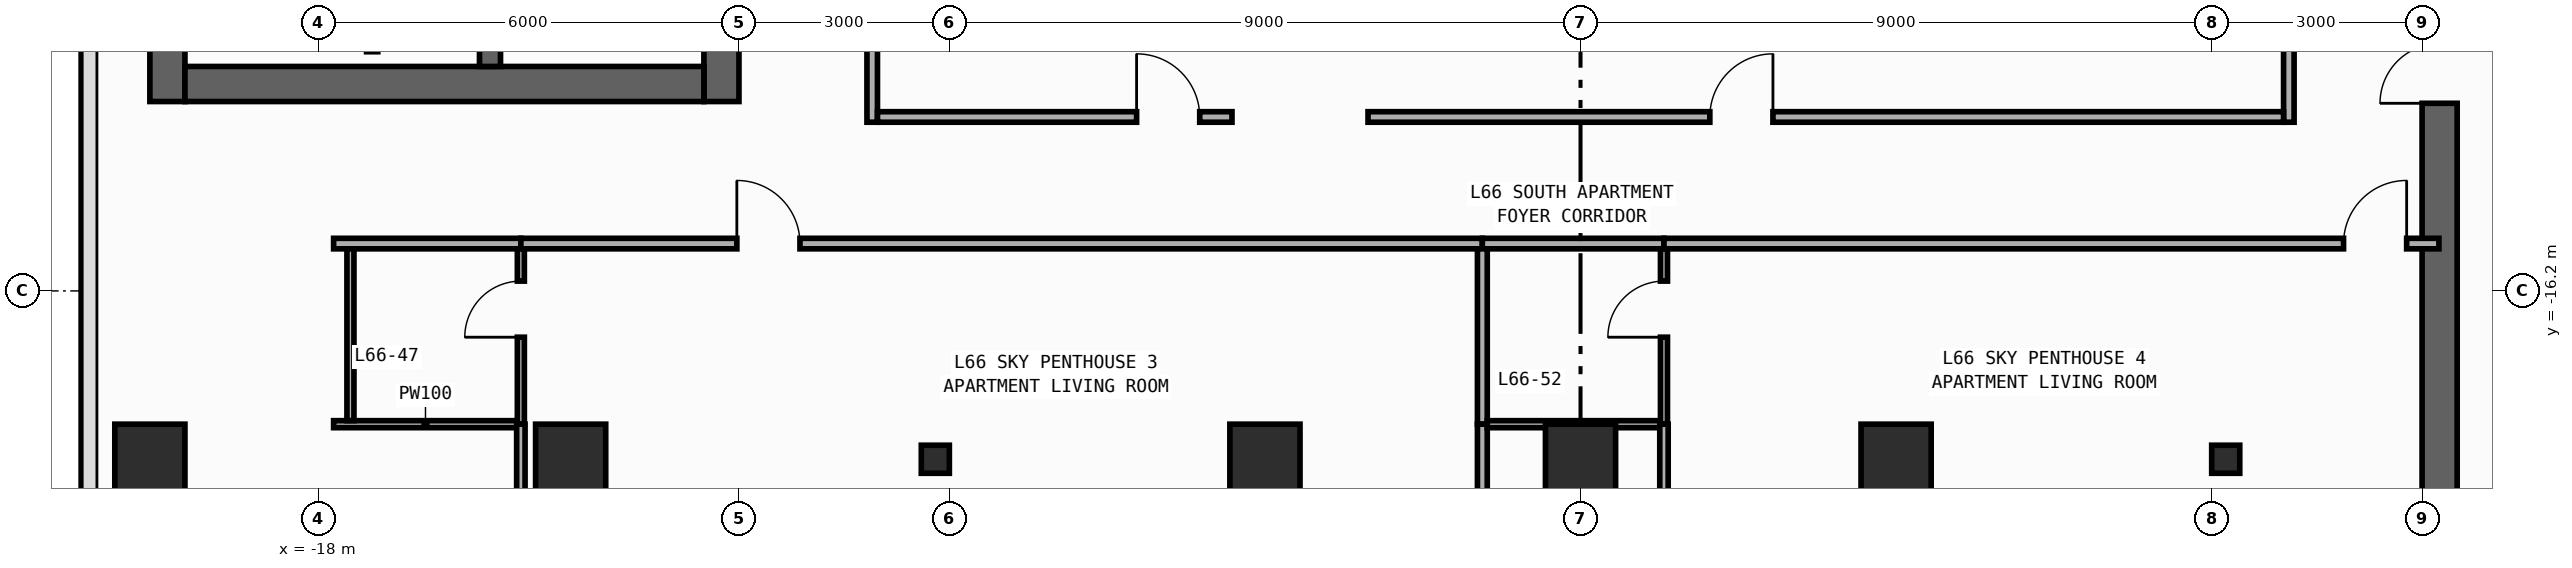
"""IFC4 building model, lengths in metres.
Left out: names, types, materials, properties, quantities, classifications, styles, units other than length and angle.
Written with IfcOpenShell. Run it as: python <this file> out.ifc"""

import sys

from ifc_helpers import new_model, si_unit, direction, frame, frame_2d, origin, origin_2d, place, context, subcontext, project, spatial, rectangle, circle, i_section, extrude, element, fill, save


model = new_model("IFC4")
c1 = context("Model", 3, precision=1e-05, world=origin(), true_north=direction((0.0, 1.0)))
c2 = subcontext(c1, "Body", "Model", "MODEL_VIEW")
j1 = project(units=[si_unit("LENGTHUNIT", "METRE"), si_unit("PLANEANGLEUNIT", "RADIAN")], contexts=[c1])
p1 = place(None, origin())
s1 = spatial("IfcSite", under=j1, at=p1, CompositionType="ELEMENT")
p2 = place(p1, origin())
s2 = spatial("IfcBuilding", under=s1, at=p2, CompositionType="ELEMENT")
p3 = place(p2, frame((0.0, 0.0, 277.6)))
s3 = spatial("IfcBuildingStorey", under=s2, at=p3, CompositionType="ELEMENT", Elevation=277.6)
p4 = place(p3, frame((-20.15, -13.5, 0.0), z_axis=(0.0, 0.0, 1.0), x_axis=(0.0, 1.0, 0.0)))
e1 = element("IfcWall", 1, at=p4, inside=s3, PredefinedType="SHEAR", context=c2, shape_type="SweptSolid", body=[
    extrude(rectangle(XDim=27.0, YDim=0.5, at=frame_2d((13.5, 0.0))), origin(), (0.0, 0.0, 1.0), 3.54),
])
p5 = place(p3, frame((-12.25, -13.5, 0.0), z_axis=(0.0, 0.0, 1.0), x_axis=(0.0, 1.0, 0.0)))
e2 = element("IfcWall", 2, at=p5, inside=s3, PredefinedType="SHEAR", context=c2, shape_type="SweptSolid", body=[
    extrude(rectangle(XDim=27.0, YDim=0.5, at=frame_2d((13.5, 0.0))), origin(), (0.0, 0.0, 1.0), 3.54),
])
p6 = place(p5, frame((15.175, 0.0, 0.0)))
e3 = element("IfcOpeningElement", 3, at=p6, cuts=e2, PredefinedType="OPENING", context=c2, shape_type="SweptSolid", body=[
    extrude(rectangle(XDim=0.85, YDim=2.1, at=frame_2d((0.425, 1.05))), frame((0.0, 0.26, 0.0), z_axis=(0.0, -1.0, 0.0), x_axis=(1.0, 0.0, 0.0)), (0.0, 0.0, 1.0), 0.52),
])
p7 = place(p5, frame((21.275, 0.0, 0.0)))
e4 = element("IfcOpeningElement", 4, at=p7, cuts=e2, PredefinedType="OPENING", context=c2, shape_type="SweptSolid", body=[
    extrude(rectangle(XDim=0.85, YDim=2.1, at=frame_2d((0.425, 1.05))), frame((0.0, 0.26, 0.0), z_axis=(0.0, -1.0, 0.0), x_axis=(1.0, 0.0, 0.0)), (0.0, 0.0, 1.0), 0.52),
])
p8 = place(p5, frame((4.275, 0.0, 0.0)))
e5 = element("IfcOpeningElement", 5, at=p8, cuts=e2, PredefinedType="OPENING", context=c2, shape_type="SweptSolid", body=[
    extrude(rectangle(XDim=0.85, YDim=2.1, at=frame_2d((0.425, 1.05))), frame((0.0, 0.26, 0.0), z_axis=(0.0, -1.0, 0.0), x_axis=(1.0, 0.0, 0.0)), (0.0, 0.0, 1.0), 0.52),
])
p9 = place(p5, frame((10.275, 0.0, 0.0)))
e6 = element("IfcOpeningElement", 6, at=p9, cuts=e2, PredefinedType="OPENING", context=c2, shape_type="SweptSolid", body=[
    extrude(rectangle(XDim=0.85, YDim=2.1, at=frame_2d((0.425, 1.05))), frame((0.0, 0.26, 0.0), z_axis=(0.0, -1.0, 0.0), x_axis=(1.0, 0.0, 0.0)), (0.0, 0.0, 1.0), 0.52),
])
p10 = place(p5, frame((12.725, 0.0, 0.0)))
e7 = element("IfcOpeningElement", 7, at=p10, cuts=e2, PredefinedType="OPENING", context=c2, shape_type="SweptSolid", body=[
    extrude(rectangle(XDim=1.15, YDim=2.2, at=frame_2d((0.575, 1.1))), frame((0.0, 0.26, 0.0), z_axis=(0.0, -1.0, 0.0), x_axis=(1.0, 0.0, 0.0)), (0.0, 0.0, 1.0), 0.52),
])
p11 = place(p5, frame((1.625, 0.0, 0.0)))
e8 = element("IfcOpeningElement", 8, at=p11, cuts=e2, PredefinedType="OPENING", context=c2, shape_type="SweptSolid", body=[
    extrude(rectangle(XDim=0.85, YDim=2.1, at=frame_2d((0.425, 1.05))), frame((0.0, 0.26, 0.0), z_axis=(0.0, -1.0, 0.0), x_axis=(1.0, 0.0, 0.0)), (0.0, 0.0, 1.0), 0.52),
])
p12 = place(p3, frame((-19.9, -13.25, 0.0), z_axis=(0.0, 0.0, 1.0), x_axis=(1.0, 0.0, 0.0)))
e9 = element("IfcWall", 9, at=p12, inside=s3, PredefinedType="SHEAR", context=c2, shape_type="SweptSolid", body=[
    extrude(rectangle(XDim=7.4, YDim=0.5, at=frame_2d((3.7, 0.0))), origin(), (0.0, 0.0, 1.0), 3.54),
])
p13 = place(p3, frame((-15.55, -13.0, 0.0), z_axis=(0.0, 0.0, 1.0), x_axis=(0.0, 1.0, 0.0)))
e10 = element("IfcWall", 10, at=p13, inside=s3, PredefinedType="SHEAR", context=c2, shape_type="SweptSolid", body=[
    extrude(rectangle(XDim=26.0, YDim=0.3, at=frame_2d((13.0, 0.0))), origin(), (0.0, 0.0, 1.0), 3.54),
])
p14 = place(p13, frame((12.225, 0.0, 0.0)))
e11 = element("IfcOpeningElement", 11, at=p14, cuts=e10, PredefinedType="OPENING", context=c2, shape_type="SweptSolid", body=[
    extrude(rectangle(XDim=1.15, YDim=2.2, at=frame_2d((0.575, 1.1))), frame((0.0, 0.16, 0.0), z_axis=(0.0, -1.0, 0.0), x_axis=(1.0, 0.0, 0.0)), (0.0, 0.0, 1.0), 0.32),
])
p15 = place(p13, frame((1.125, 0.0, 0.0)))
e12 = element("IfcOpeningElement", 12, at=p15, cuts=e10, PredefinedType="OPENING", context=c2, shape_type="SweptSolid", body=[
    extrude(rectangle(XDim=0.85, YDim=2.1, at=frame_2d((0.425, 1.05))), frame((0.0, 0.16, 0.0), z_axis=(0.0, -1.0, 0.0), x_axis=(1.0, 0.0, 0.0)), (0.0, 0.0, 1.0), 0.32),
])
p16 = place(p3, frame((12.25, -19.8, 0.0), z_axis=(0.0, 0.0, 1.0), x_axis=(0.0, 1.0, 0.0)))
e13 = element("IfcWall", 13, at=p16, inside=s3, PredefinedType="SHEAR", context=c2, shape_type="SweptSolid", body=[
    extrude(rectangle(XDim=27.0, YDim=0.5, at=frame_2d((13.5, 0.0))), origin(), (0.0, 0.0, 1.0), 3.54),
])
p17 = place(p16, frame((23.05, 0.0, 0.0)))
e14 = element("IfcOpeningElement", 14, at=p17, cuts=e13, PredefinedType="OPENING", context=c2, shape_type="SweptSolid", body=[
    extrude(rectangle(XDim=1.1, YDim=2.2, at=frame_2d((0.55, 1.1))), frame((0.0, 0.26, 0.0), z_axis=(0.0, -1.0, 0.0), x_axis=(1.0, 0.0, 0.0)), (0.0, 0.0, 1.0), 0.52),
])
p18 = place(p16, frame((19.85, 0.0, 0.0)))
e15 = element("IfcOpeningElement", 15, at=p18, cuts=e13, PredefinedType="OPENING", context=c2, shape_type="SweptSolid", body=[
    extrude(rectangle(XDim=1.1, YDim=2.2, at=frame_2d((0.55, 1.1))), frame((0.0, 0.26, 0.0), z_axis=(0.0, -1.0, 0.0), x_axis=(1.0, 0.0, 0.0)), (0.0, 0.0, 1.0), 0.52),
])
p19 = place(p16, frame((16.65, 0.0, 0.0)))
e16 = element("IfcOpeningElement", 16, at=p19, cuts=e13, PredefinedType="OPENING", context=c2, shape_type="SweptSolid", body=[
    extrude(rectangle(XDim=1.1, YDim=2.2, at=frame_2d((0.55, 1.1))), frame((0.0, 0.26, 0.0), z_axis=(0.0, -1.0, 0.0), x_axis=(1.0, 0.0, 0.0)), (0.0, 0.0, 1.0), 0.52),
])
p20 = place(p16, frame((6.275, 0.0, 0.0)))
e17 = element("IfcOpeningElement", 17, at=p20, cuts=e13, PredefinedType="OPENING", context=c2, shape_type="SweptSolid", body=[
    extrude(rectangle(XDim=0.85, YDim=2.1, at=frame_2d((0.425, 1.05))), frame((0.0, 0.26, 0.0), z_axis=(0.0, -1.0, 0.0), x_axis=(1.0, 0.0, 0.0)), (0.0, 0.0, 1.0), 0.52),
])
p21 = place(p16, frame((8.575, 0.0, 0.0)))
e18 = element("IfcOpeningElement", 18, at=p21, cuts=e13, PredefinedType="OPENING", context=c2, shape_type="SweptSolid", body=[
    extrude(rectangle(XDim=0.85, YDim=2.1, at=frame_2d((0.425, 1.05))), frame((0.0, 0.26, 0.0), z_axis=(0.0, -1.0, 0.0), x_axis=(1.0, 0.0, 0.0)), (0.0, 0.0, 1.0), 0.52),
])
p22 = place(p16, frame((10.675, 0.0, 0.0)))
e19 = element("IfcOpeningElement", 19, at=p22, cuts=e13, PredefinedType="OPENING", context=c2, shape_type="SweptSolid", body=[
    extrude(rectangle(XDim=0.85, YDim=2.1, at=frame_2d((0.425, 1.05))), frame((0.0, 0.26, 0.0), z_axis=(0.0, -1.0, 0.0), x_axis=(1.0, 0.0, 0.0)), (0.0, 0.0, 1.0), 0.52),
])
p23 = place(p16, frame((12.725, 0.0, 0.0)))
e20 = element("IfcOpeningElement", 20, at=p23, cuts=e13, PredefinedType="OPENING", context=c2, shape_type="SweptSolid", body=[
    extrude(rectangle(XDim=1.15, YDim=2.2, at=frame_2d((0.575, 1.1))), frame((0.0, 0.26, 0.0), z_axis=(0.0, -1.0, 0.0), x_axis=(1.0, 0.0, 0.0)), (0.0, 0.0, 1.0), 0.52),
])
p24 = place(p16, frame((25.125, 0.0, 0.0)))
e21 = element("IfcOpeningElement", 21, at=p24, cuts=e13, PredefinedType="OPENING", context=c2, shape_type="SweptSolid", body=[
    extrude(rectangle(XDim=0.85, YDim=2.1, at=frame_2d((0.425, 1.05))), frame((0.0, 0.26, 0.0), z_axis=(0.0, -1.0, 0.0), x_axis=(1.0, 0.0, 0.0)), (0.0, 0.0, 1.0), 0.52),
])
for number, where, z_axis, x_axis in (
    (22, (-9.2, -18.6, 0.0), (0.0, 0.0, 1.0), (1.0, 0.0, 0.0)),
    (23, (9.2, -18.6, 0.0), (0.0, 0.0, 1.0), (1.0, 0.0, 0.0)),
):
    element("IfcColumn", number, at=place(p3, frame(where, z_axis=z_axis, x_axis=x_axis)), inside=s3, PredefinedType="COLUMN", context=c2, shape_type="SweptSolid", body=[
        extrude(i_section(OverallWidth=0.4, OverallDepth=0.4, WebThickness=0.013, FlangeThickness=0.021, FilletRadius=0.022, at=origin_2d()), origin(), (0.0, 0.0, 1.0), 3.8),
    ])
for number, where, z_axis, x_axis in (
    (24, (-20.4, -18.6, 0.0), (0.0, 0.0, 1.0), (1.0, 0.0, 0.0)),
    (25, (-14.4, -18.6, 0.0), (0.0, 0.0, 1.0), (1.0, 0.0, 0.0)),
    (26, (-4.5, -18.6, 0.0), (0.0, 0.0, 1.0), (1.0, 0.0, 0.0)),
    (27, (0.0, -18.6, 0.0), (0.0, 0.0, 1.0), (1.0, 0.0, 0.0)),
    (28, (4.5, -18.6, 0.0), (0.0, 0.0, 1.0), (1.0, 0.0, 0.0)),
):
    element("IfcColumn", number, at=place(p3, frame(where, z_axis=z_axis, x_axis=x_axis)), inside=s3, PredefinedType="COLUMN", context=c2, shape_type="SweptSolid", body=[
        extrude(circle(Radius=0.5, at=origin_2d()), origin(), (0.0, 0.0, 1.0), 3.8),
    ])
p25 = place(p3, frame((-10.1, -13.795, 0.0), z_axis=(0.0, 0.0, 1.0), x_axis=(0.0, 1.0, 0.0)))
e29 = element("IfcWall", 29, at=p25, inside=s3, PredefinedType="PARTITIONING", context=c2, shape_type="SweptSolid", body=[
    extrude(rectangle(XDim=9.005, YDim=0.15, at=frame_2d((4.502, 0.0))), origin(), (0.0, 0.0, 1.0), 3.54),
])
p26 = place(p25, frame((7.645, 0.0, 0.0)))
e30 = element("IfcOpeningElement", 30, at=p26, cuts=e29, PredefinedType="OPENING", context=c2, shape_type="SweptSolid", body=[
    extrude(rectangle(XDim=0.9, YDim=2.15, at=frame_2d((0.45, 1.075))), frame((0.0, 0.085, 0.0), z_axis=(0.0, -1.0, 0.0), x_axis=(1.0, 0.0, 0.0)), (0.0, 0.0, 1.0), 0.17),
])
p27 = place(p3, frame((10.1, -13.795, 0.0), z_axis=(0.0, 0.0, 1.0), x_axis=(0.0, 1.0, 0.0)))
e31 = element("IfcWall", 31, at=p27, inside=s3, PredefinedType="PARTITIONING", context=c2, shape_type="SweptSolid", body=[
    extrude(rectangle(XDim=6.375, YDim=0.15, at=frame_2d((3.188, 0.0))), origin(), (0.0, 0.0, 1.0), 3.54),
])
p28 = place(p27, frame((5.015, 0.0, 0.0)))
e32 = element("IfcOpeningElement", 32, at=p28, cuts=e31, PredefinedType="OPENING", context=c2, shape_type="SweptSolid", body=[
    extrude(rectangle(XDim=0.9, YDim=2.15, at=frame_2d((0.45, 1.075))), frame((0.0, 0.085, 0.0), z_axis=(0.0, -1.0, 0.0), x_axis=(1.0, 0.0, 0.0)), (0.0, 0.0, 1.0), 0.17),
])
p29 = place(p3, frame((-17.78, -15.525, 0.0), z_axis=(0.0, 0.0, 1.0), x_axis=(1.0, 0.0, 0.0)))
e33 = element("IfcWall", 33, at=p29, inside=s3, PredefinedType="PARTITIONING", context=c2, shape_type="SweptSolid", body=[
    extrude(rectangle(XDim=2.67, YDim=0.15, at=frame_2d((1.335, 0.0))), origin(), (0.0, 0.0, 1.0), 3.54),
])
p30 = place(p3, frame((-15.11, -15.525, 0.0), z_axis=(0.0, 0.0, 1.0), x_axis=(1.0, 0.0, 0.0)))
e34 = element("IfcWall", 34, at=p30, inside=s3, PredefinedType="PARTITIONING", context=c2, shape_type="SweptSolid", body=[
    extrude(rectangle(XDim=13.71, YDim=0.15, at=frame_2d((6.855, 0.0))), origin(), (0.0, 0.0, 1.0), 3.54),
])
p31 = place(p30, frame((3.08, 0.0, 0.0)))
e35 = element("IfcOpeningElement", 35, at=p31, cuts=e34, PredefinedType="OPENING", context=c2, shape_type="SweptSolid", body=[
    extrude(rectangle(XDim=0.9, YDim=2.15, at=frame_2d((0.45, 1.075))), frame((0.0, 0.085, 0.0), z_axis=(0.0, -1.0, 0.0), x_axis=(1.0, 0.0, 0.0)), (0.0, 0.0, 1.0), 0.17),
])
p32 = place(p3, frame((-1.4, -15.525, 0.0), z_axis=(0.0, 0.0, 1.0), x_axis=(1.0, 0.0, 0.0)))
e36 = element("IfcWall", 36, at=p32, inside=s3, PredefinedType="PARTITIONING", context=c2, shape_type="SweptSolid", body=[
    extrude(rectangle(XDim=2.59, YDim=0.15, at=frame_2d((1.295, 0.0))), origin(), (0.0, 0.0, 1.0), 3.54),
])
p33 = place(p3, frame((1.19, -15.525, 0.0), z_axis=(0.0, 0.0, 1.0), x_axis=(1.0, 0.0, 0.0)))
e37 = element("IfcWall", 37, at=p33, inside=s3, PredefinedType="PARTITIONING", context=c2, shape_type="SweptSolid", body=[
    extrude(rectangle(XDim=11.05, YDim=0.15, at=frame_2d((5.525, 0.0))), origin(), (0.0, 0.0, 1.0), 3.54),
])
p34 = place(p33, frame((9.69, 0.0, 0.0)))
e38 = element("IfcOpeningElement", 38, at=p34, cuts=e37, PredefinedType="OPENING", context=c2, shape_type="SweptSolid", body=[
    extrude(rectangle(XDim=0.9, YDim=2.15, at=frame_2d((0.45, 1.075))), frame((0.0, 0.085, 0.0), z_axis=(0.0, -1.0, 0.0), x_axis=(1.0, 0.0, 0.0)), (0.0, 0.0, 1.0), 0.17),
])
p35 = place(p3, frame((-10.025, -13.72, 0.0), z_axis=(0.0, 0.0, 1.0), x_axis=(1.0, 0.0, 0.0)))
e39 = element("IfcWall", 39, at=p35, inside=s3, PredefinedType="PARTITIONING", context=c2, shape_type="SweptSolid", body=[
    extrude(rectangle(XDim=5.055, YDim=0.15, at=frame_2d((2.527, 0.0))), origin(), (0.0, 0.0, 1.0), 3.54),
])
p36 = place(p35, frame((3.695, 0.0, 0.0)))
e40 = element("IfcOpeningElement", 40, at=p36, cuts=e39, PredefinedType="OPENING", context=c2, shape_type="SweptSolid", body=[
    extrude(rectangle(XDim=0.9, YDim=2.15, at=frame_2d((0.45, 1.075))), frame((0.0, 0.085, 0.0), z_axis=(0.0, -1.0, 0.0), x_axis=(1.0, 0.0, 0.0)), (0.0, 0.0, 1.0), 0.17),
])
p37 = place(p3, frame((-3.03, -13.72, 0.0), z_axis=(0.0, 0.0, 1.0), x_axis=(1.0, 0.0, 0.0)))
e41 = element("IfcWall", 41, at=p37, inside=s3, PredefinedType="PARTITIONING", context=c2, shape_type="SweptSolid", body=[
    extrude(rectangle(XDim=13.055, YDim=0.15, at=frame_2d((6.527, 0.0))), origin(), (0.0, 0.0, 1.0), 3.54),
])
p38 = place(p37, frame((4.874, 0.0, 0.0)))
e42 = element("IfcOpeningElement", 42, at=p38, cuts=e41, PredefinedType="OPENING", context=c2, shape_type="SweptSolid", body=[
    extrude(rectangle(XDim=0.9, YDim=2.15, at=frame_2d((0.45, 1.075))), frame((0.0, 0.085, 0.0), z_axis=(0.0, -1.0, 0.0), x_axis=(1.0, 0.0, 0.0)), (0.0, 0.0, 1.0), 0.17),
])
p39 = place(p3, frame((-17.78, -18.1, 0.0), z_axis=(0.0, 0.0, 1.0), x_axis=(1.0, 0.0, 0.0)))
e43 = element("IfcWall", 43, at=p39, inside=s3, PredefinedType="PARTITIONING", context=c2, shape_type="SweptSolid", body=[
    extrude(rectangle(XDim=2.62, YDim=0.1, at=frame_2d((1.31, 0.0))), origin(), (0.0, 0.0, 1.0), 3.54),
])
p40 = place(p3, frame((-15.11, -18.1, 0.0), z_axis=(0.0, 0.0, 1.0), x_axis=(0.0, 1.0, 0.0)))
e44 = element("IfcWall", 44, at=p40, inside=s3, PredefinedType="PARTITIONING", context=c2, shape_type="SweptSolid", body=[
    extrude(rectangle(XDim=2.5, YDim=0.1, at=frame_2d((1.25, 0.0))), origin(), (0.0, 0.0, 1.0), 3.54),
])
p41 = place(p40, frame((1.24, 0.0, 0.0)))
e45 = element("IfcOpeningElement", 45, at=p41, cuts=e44, PredefinedType="OPENING", context=c2, shape_type="SweptSolid", body=[
    extrude(rectangle(XDim=0.8, YDim=2.1, at=frame_2d((0.4, 1.05))), frame((0.0, 0.06, 0.0), z_axis=(0.0, -1.0, 0.0), x_axis=(1.0, 0.0, 0.0)), (0.0, 0.0, 1.0), 0.12),
])
p42 = place(p3, frame((-15.11, -20.1, 0.0), z_axis=(0.0, 0.0, 1.0), x_axis=(0.0, 1.0, 0.0)))
e46 = element("IfcWall", 46, at=p42, inside=s3, PredefinedType="PARTITIONING", context=c2, shape_type="SweptSolid", body=[
    extrude(rectangle(XDim=2.0, YDim=0.12, at=frame_2d((1.0, 0.0))), origin(), (0.0, 0.0, 1.0), 3.54),
])
p43 = place(p3, frame((-1.4, -18.1, 0.0), z_axis=(0.0, 0.0, 1.0), x_axis=(0.0, 1.0, 0.0)))
e47 = element("IfcWall", 47, at=p43, inside=s3, PredefinedType="PARTITIONING", context=c2, shape_type="SweptSolid", body=[
    extrude(rectangle(XDim=2.5, YDim=0.14, at=frame_2d((1.25, 0.0))), origin(), (0.0, 0.0, 1.0), 3.54),
])
p44 = place(p3, frame((-1.4, -20.1, 0.0), z_axis=(0.0, 0.0, 1.0), x_axis=(0.0, 1.0, 0.0)))
e48 = element("IfcWall", 48, at=p44, inside=s3, PredefinedType="PARTITIONING", context=c2, shape_type="SweptSolid", body=[
    extrude(rectangle(XDim=2.0, YDim=0.14, at=frame_2d((1.0, 0.0))), origin(), (0.0, 0.0, 1.0), 3.54),
])
p45 = place(p3, frame((-1.33, -18.1, 0.0), z_axis=(0.0, 0.0, 1.0), x_axis=(1.0, 0.0, 0.0)))
e49 = element("IfcWall", 49, at=p45, inside=s3, PredefinedType="PARTITIONING", context=c2, shape_type="SweptSolid", body=[
    extrude(rectangle(XDim=2.47, YDim=0.1, at=frame_2d((1.235, 0.0))), origin(), (0.0, 0.0, 1.0), 3.54),
])
p46 = place(p3, frame((1.19, -18.1, 0.0), z_axis=(0.0, 0.0, 1.0), x_axis=(0.0, 1.0, 0.0)))
e50 = element("IfcWall", 50, at=p46, inside=s3, PredefinedType="PARTITIONING", context=c2, shape_type="SweptSolid", body=[
    extrude(rectangle(XDim=2.5, YDim=0.1, at=frame_2d((1.25, 0.0))), origin(), (0.0, 0.0, 1.0), 3.54),
])
p47 = place(p46, frame((1.24, 0.0, 0.0)))
e51 = element("IfcOpeningElement", 51, at=p47, cuts=e50, PredefinedType="OPENING", context=c2, shape_type="SweptSolid", body=[
    extrude(rectangle(XDim=0.8, YDim=2.1, at=frame_2d((0.4, 1.05))), frame((0.0, 0.06, 0.0), z_axis=(0.0, -1.0, 0.0), x_axis=(1.0, 0.0, 0.0)), (0.0, 0.0, 1.0), 0.12),
])
p48 = place(p3, frame((1.19, -20.1, 0.0), z_axis=(0.0, 0.0, 1.0), x_axis=(0.0, 1.0, 0.0)))
e52 = element("IfcWall", 52, at=p48, inside=s3, PredefinedType="PARTITIONING", context=c2, shape_type="SweptSolid", body=[
    extrude(rectangle(XDim=2.0, YDim=0.12, at=frame_2d((1.0, 0.0))), origin(), (0.0, 0.0, 1.0), 3.54),
])
p49 = place(p3, frame((-17.54, -18.05, 0.0), z_axis=(0.0, 0.0, 1.0), x_axis=(0.0, 1.0, 0.0)))
e53 = element("IfcWall", 53, at=p49, inside=s3, PredefinedType="PARTITIONING", context=c2, shape_type="SweptSolid", body=[
    extrude(rectangle(XDim=2.45, YDim=0.1, at=frame_2d((1.225, 0.0))), origin(), (0.0, 0.0, 1.0), 3.54),
])
p50 = place(p20, origin())
e54 = element("IfcDoor", 54, at=p50, inside=s3, OperationType="SINGLE_SWING_LEFT", PredefinedType="DOOR", context=c2, shape_type="SweptSolid", body=[
    extrude(rectangle(XDim=0.85, YDim=2.1, at=frame_2d((0.425, 1.05))), frame((0.0, 0.025, 0.0), z_axis=(0.0, -1.0, 0.0), x_axis=(1.0, 0.0, 0.0)), (0.0, 0.0, 1.0), 0.05),
])
fill(e17, e54)
p51 = place(p31, origin())
e55 = element("IfcDoor", 55, at=p51, inside=s3, OperationType="SINGLE_SWING_LEFT", PredefinedType="DOOR", context=c2, shape_type="SweptSolid", body=[
    extrude(rectangle(XDim=0.9, YDim=2.15, at=frame_2d((0.45, 1.075))), frame((0.0, 0.025, 0.0), z_axis=(0.0, -1.0, 0.0), x_axis=(1.0, 0.0, 0.0)), (0.0, 0.0, 1.0), 0.05),
])
fill(e35, e55)
p52 = place(p34, origin())
e56 = element("IfcDoor", 56, at=p52, inside=s3, OperationType="SINGLE_SWING_RIGHT", PredefinedType="DOOR", context=c2, shape_type="SweptSolid", body=[
    extrude(rectangle(XDim=0.9, YDim=2.15, at=frame_2d((0.45, 1.075))), frame((0.0, 0.025, 0.0), z_axis=(0.0, -1.0, 0.0), x_axis=(1.0, 0.0, 0.0)), (0.0, 0.0, 1.0), 0.05),
])
fill(e38, e56)
p53 = place(p36, origin())
e57 = element("IfcDoor", 57, at=p53, inside=s3, OperationType="SINGLE_SWING_LEFT", PredefinedType="DOOR", context=c2, shape_type="SweptSolid", body=[
    extrude(rectangle(XDim=0.9, YDim=2.15, at=frame_2d((0.45, 1.075))), frame((0.0, 0.025, 0.0), z_axis=(0.0, -1.0, 0.0), x_axis=(1.0, 0.0, 0.0)), (0.0, 0.0, 1.0), 0.05),
])
fill(e40, e57)
p54 = place(p38, origin())
e58 = element("IfcDoor", 58, at=p54, inside=s3, OperationType="SINGLE_SWING_RIGHT", PredefinedType="DOOR", context=c2, shape_type="SweptSolid", body=[
    extrude(rectangle(XDim=0.9, YDim=2.15, at=frame_2d((0.45, 1.075))), frame((0.0, 0.025, 0.0), z_axis=(0.0, -1.0, 0.0), x_axis=(1.0, 0.0, 0.0)), (0.0, 0.0, 1.0), 0.05),
])
fill(e42, e58)
p55 = place(p41, origin())
e59 = element("IfcDoor", 59, at=p55, inside=s3, OperationType="SINGLE_SWING_LEFT", PredefinedType="DOOR", context=c2, shape_type="SweptSolid", body=[
    extrude(rectangle(XDim=0.8, YDim=2.1, at=frame_2d((0.4, 1.05))), frame((0.0, 0.025, 0.0), z_axis=(0.0, -1.0, 0.0), x_axis=(1.0, 0.0, 0.0)), (0.0, 0.0, 1.0), 0.05),
])
fill(e45, e59)
p56 = place(p47, origin())
e60 = element("IfcDoor", 60, at=p56, inside=s3, OperationType="SINGLE_SWING_LEFT", PredefinedType="DOOR", context=c2, shape_type="SweptSolid", body=[
    extrude(rectangle(XDim=0.8, YDim=2.1, at=frame_2d((0.4, 1.05))), frame((0.0, 0.025, 0.0), z_axis=(0.0, -1.0, 0.0), x_axis=(1.0, 0.0, 0.0)), (0.0, 0.0, 1.0), 0.05),
])
fill(e51, e60)
save(model, sys.argv[1])
